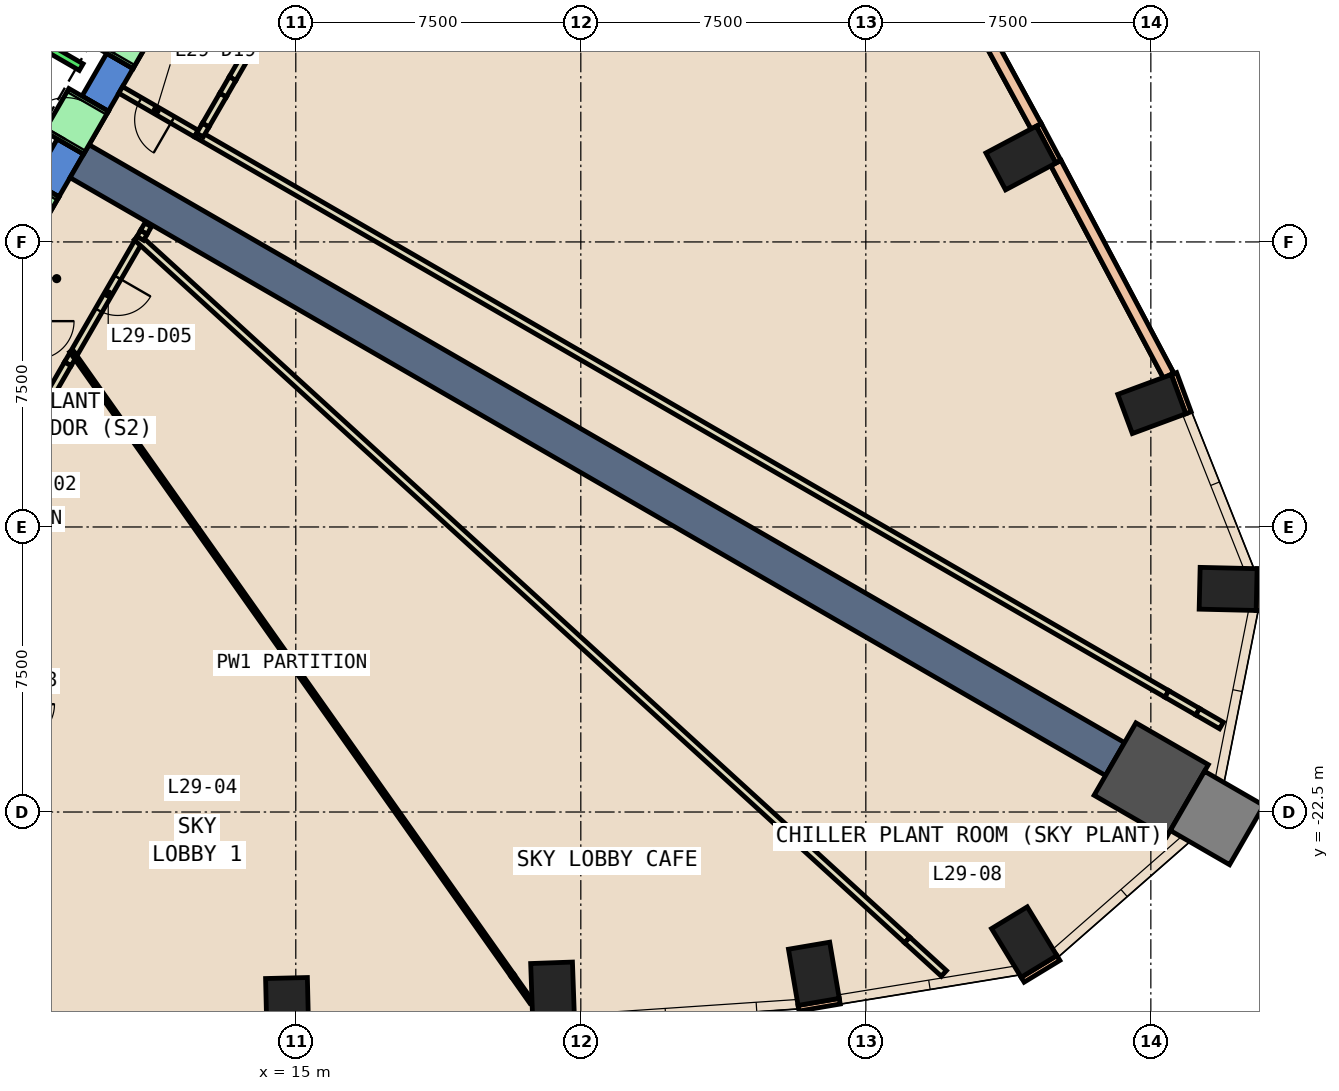
"""IFC4 building model, lengths in metres.
Left out: names, types, materials, properties, quantities, classifications, styles, units other than length and angle.
Written with IfcOpenShell. Run it as: python <this file> out.ifc"""

import sys

from ifc_helpers import new_model, si_unit, direction, frame, frame_2d, origin, origin_2d, place, context, subcontext, project, spatial, polyline, rectangle, outline, extrude, element, fill, save


model = new_model("IFC4")
c1 = context("Model", 3, precision=1e-05, world=origin(), true_north=direction((0.0, 1.0)))
c2 = subcontext(c1, "Body", "Model", "MODEL_VIEW")
j1 = project(units=[si_unit("LENGTHUNIT", "METRE"), si_unit("PLANEANGLEUNIT", "RADIAN")], contexts=[c1])
p1 = place(None, origin())
s1 = spatial("IfcSite", under=j1, at=p1, CompositionType="ELEMENT")
p2 = place(p1, origin())
s2 = spatial("IfcBuilding", under=s1, at=p2, CompositionType="ELEMENT")
p3 = place(p2, frame((0.0, 0.0, 132.8)))
s3 = spatial("IfcBuildingStorey", under=s2, at=p3, CompositionType="ELEMENT", Elevation=132.8)
for number, where, z_axis, x_axis in (
    (1, (14.773, -27.618, -0.6), (0.0, 0.0, 1.0), (1.0, 0.024, 0.0)),
    (2, (21.757, -27.217, -0.6), (0.0, 0.0, 1.0), (0.999, 0.035, 0.0)),
    (3, (28.633, -26.757, -0.6), (0.0, 0.0, 1.0), (0.986, 0.168, 0.0)),
    (4, (34.168, -25.922, -0.6), (0.0, 0.0, 1.0), (0.854, 0.52, 0.0)),
):
    element("IfcColumn", number, at=place(p3, frame(where, z_axis=z_axis, x_axis=x_axis)), inside=s3, PredefinedType="COLUMN", context=c2, shape_type="SweptSolid", body=[
        extrude(rectangle(XDim=1.1, YDim=1.5, at=origin_2d()), origin(), (0.0, 0.0, 1.0), 5.4),
    ])
p4 = place(p3, frame((37.51, -21.657, -0.6), z_axis=(0.0, 0.0, 1.0), x_axis=(-0.866025403784, 0.5, 0.0)))
e5 = element("IfcColumn", 5, at=p4, inside=s3, PredefinedType="COLUMN", context=c2, shape_type="SweptSolid", body=[
    extrude(rectangle(XDim=2.2, YDim=2.2, at=origin_2d()), origin(), (0.0, 0.0, 1.0), 5.4),
])
for number, where, z_axis, x_axis in (
    (6, (39.534, -16.63, -0.6), (0.0, 0.0, 1.0), (0.023, 1.0, 0.0)),
    (7, (37.525, -11.766, -0.6), (0.0, 0.0, 1.0), (-0.347, 0.938, 0.0)),
    (8, (34.081, -5.292, -0.6), (0.0, 0.0, 1.0), (-0.469, 0.883, 0.0)),
):
    element("IfcColumn", number, at=place(p3, frame(where, z_axis=z_axis, x_axis=x_axis)), inside=s3, PredefinedType="COLUMN", context=c2, shape_type="SweptSolid", body=[
        extrude(rectangle(XDim=1.1, YDim=1.5, at=origin_2d()), origin(), (0.0, 0.0, 1.0), 5.4),
    ])
p5 = place(p3, frame((39.242, -22.657, -0.6), z_axis=(0.0, 0.0, 1.0), x_axis=(-0.866025403784, 0.5, 0.0)))
e9 = element("IfcColumn", 9, at=p5, inside=s3, PredefinedType="COLUMN", context=c2, shape_type="SweptSolid", body=[
    extrude(rectangle(XDim=1.8, YDim=1.8, at=origin_2d()), origin(), (0.0, 0.0, 1.0), 5.4),
])
p6 = place(p3, frame((0.0, 0.0, -0.6)))
e10 = element("IfcWall", 10, at=p6, inside=s3, PredefinedType="SHEAR", context=c2, shape_type="SweptSolid", body=[
    extrude(outline(polyline([(9.417, -5.189), (8.724, -4.789), (8.075, -5.914), (8.767, -6.314), (9.417, -5.189)])), origin(), (0.0, 0.0, 1.0), 5.4),
])
p7 = place(p3, frame((0.0, 0.0, -0.6)))
e11 = element("IfcWall", 11, at=p7, inside=s3, PredefinedType="SHEAR", context=c2, shape_type="SweptSolid", body=[
    extrude(outline(polyline([(10.717, -2.937), (10.025, -2.537), (9.374, -3.663), (10.067, -4.063), (10.717, -2.937)])), origin(), (0.0, 0.0, 1.0), 5.4),
])
p8 = place(p3, frame((0.0, 0.0, 3.6)))
e12 = element("IfcWall", 12, at=p8, inside=s3, PredefinedType="SHEAR", context=c2, shape_type="SweptSolid", body=[
    extrude(outline(polyline([(8.767, -6.314), (8.075, -5.914), (7.424, -7.04), (8.117, -7.44), (8.767, -6.314)])), origin(), (0.0, 0.0, 1.0), 1.2),
])
p9 = place(p3, frame((0.0, 0.0, 3.6)))
e13 = element("IfcWall", 13, at=p9, inside=s3, PredefinedType="SHEAR", context=c2, shape_type="SweptSolid", body=[
    extrude(outline(polyline([(10.067, -4.063), (9.374, -3.663), (8.724, -4.789), (9.417, -5.189), (10.067, -4.063)])), origin(), (0.0, 0.0, 1.0), 1.2),
])
p10 = place(p3, frame((0.0, 0.0, 3.6)))
e14 = element("IfcWall", 14, at=p10, inside=s3, PredefinedType="SHEAR", context=c2, shape_type="SweptSolid", body=[
    extrude(outline(polyline([(11.367, -1.811), (10.675, -1.411), (10.025, -2.537), (10.717, -2.937), (11.367, -1.811)])), origin(), (0.0, 0.0, 1.0), 1.2),
])
p11 = place(p3, frame((9.31, -5.375, 0.0), z_axis=(0.0, 0.0, 1.0), x_axis=(0.86602173752, -0.500006350103, 0.0)))
e15 = element("IfcWall", 15, at=p11, inside=s3, PredefinedType="SHEAR", context=c2, shape_type="SweptSolid", body=[
    extrude(rectangle(XDim=31.463, YDim=1.0, at=frame_2d((15.732, 0.0))), origin(), (0.0, 0.0, 1.0), 4.8),
])
p12 = place(p3, frame((38.49, -11.995, 0.0), z_axis=(0.0, 0.0, 1.0), x_axis=(-0.347133743566, 0.937815634375, 0.0)))
e16 = element("IfcWall", 16, at=p12, inside=s3, PredefinedType="STANDARD", context=c2, shape_type="SweptSolid", body=[
    extrude(rectangle(XDim=1.101, YDim=0.15, at=frame_2d((0.55, 0.0))), origin(), (0.0, 0.0, 1.0), 4.8),
])
p13 = place(p3, frame((35.068, -5.391, 0.0), z_axis=(0.0, 0.0, 1.0), x_axis=(-0.469274244365, 0.883052480646, 0.0)))
e17 = element("IfcWall", 17, at=p13, inside=s3, PredefinedType="STANDARD", context=c2, shape_type="SweptSolid", body=[
    extrude(rectangle(XDim=1.1, YDim=0.15, at=frame_2d((0.55, 0.0))), origin(), (0.0, 0.0, 1.0), 4.8),
])
p14 = place(p3, frame((28.229, -27.663, 0.0), z_axis=(0.0, 0.0, 1.0), x_axis=(0.985763338892, 0.168138751323, 0.0)))
e18 = element("IfcWall", 18, at=p14, inside=s3, PredefinedType="STANDARD", context=c2, shape_type="SweptSolid", body=[
    extrude(rectangle(XDim=1.101, YDim=0.15, at=frame_2d((0.55, 0.0))), origin(), (0.0, 0.0, 1.0), 4.8),
])
p15 = place(p3, frame((34.127, -26.913, 0.0), z_axis=(0.0, 0.0, 1.0), x_axis=(0.854245682901, 0.519869515594, 0.0)))
e19 = element("IfcWall", 19, at=p15, inside=s3, PredefinedType="STANDARD", context=c2, shape_type="SweptSolid", body=[
    extrude(rectangle(XDim=1.1, YDim=0.15, at=frame_2d((0.55, 0.0))), origin(), (0.0, 0.0, 1.0), 4.8),
])
p16 = place(p3, frame((40.346, -17.199, 0.0), z_axis=(0.0, 0.0, 1.0), x_axis=(0.023744690764, 0.999718055084, 0.0)))
e20 = element("IfcWall", 20, at=p16, inside=s3, PredefinedType="STANDARD", context=c2, shape_type="SweptSolid", body=[
    extrude(rectangle(XDim=1.1, YDim=0.15, at=frame_2d((0.55, 0.0))), origin(), (0.0, 0.0, 1.0), 4.8),
])
p17 = place(p3, frame((37.967, -11.016, 0.0), z_axis=(0.0, 0.0, 1.0), x_axis=(-0.468639020107, 0.88338976043, 0.0)))
e21 = element("IfcWall", 21, at=p17, inside=s3, PredefinedType="STANDARD", context=c2, shape_type="SweptSolid", body=[
    extrude(rectangle(XDim=6.329, YDim=0.3, at=frame_2d((3.165, 0.0))), origin(), (0.0, 0.0, 1.0), 1.2),
])
p18 = place(p3, frame((37.967, -11.016, 4.0), z_axis=(0.0, 0.0, 1.0), x_axis=(-0.468639020107, 0.88338976043, 0.0)))
e22 = element("IfcWall", 22, at=p18, inside=s3, PredefinedType="STANDARD", context=c2, shape_type="SweptSolid", body=[
    extrude(rectangle(XDim=6.329, YDim=0.3, at=frame_2d((3.165, 0.0))), origin(), (0.0, 0.0, 1.0), 0.8),
])
p19 = place(p3, frame((34.481, -4.458, 0.0), z_axis=(0.0, 0.0, 1.0), x_axis=(-0.477655263247, 0.878547351879, 0.0)))
e23 = element("IfcWall", 23, at=p19, inside=s3, PredefinedType="STANDARD", context=c2, shape_type="SweptSolid", body=[
    extrude(rectangle(XDim=6.119, YDim=0.3, at=frame_2d((3.06, 0.0))), origin(), (0.0, 0.0, 1.0), 1.2),
])
p20 = place(p3, frame((34.481, -4.458, 4.0), z_axis=(0.0, 0.0, 1.0), x_axis=(-0.477655263247, 0.878547351879, 0.0)))
e24 = element("IfcWall", 24, at=p20, inside=s3, PredefinedType="STANDARD", context=c2, shape_type="SweptSolid", body=[
    extrude(rectangle(XDim=6.119, YDim=0.3, at=frame_2d((3.06, 0.0))), origin(), (0.0, 0.0, 1.0), 0.8),
])
p21 = place(p3, frame((9.145, -10.46, 0.0), z_axis=(0.0, 0.0, 1.0), x_axis=(-0.500701704226, -0.865619895442, 0.0)))
e25 = element("IfcWall", 25, at=p21, inside=s3, PredefinedType="PARTITIONING", context=c2, shape_type="SweptSolid", body=[
    extrude(rectangle(XDim=0.288, YDim=0.2, at=frame_2d((0.144, 0.0))), origin(), (0.0, 0.0, 1.0), 4.8),
])
p22 = place(p3, frame((10.89, -7.437, 0.0), z_axis=(0.0, 0.0, 1.0), x_axis=(-0.499905227862, -0.86608011359, 0.0)))
e26 = element("IfcWall", 26, at=p22, inside=s3, PredefinedType="PARTITIONING", context=c2, shape_type="SweptSolid", body=[
    extrude(rectangle(XDim=3.43, YDim=0.2, at=frame_2d((1.715, 0.0))), origin(), (0.0, 0.0, 1.0), 4.8),
])
p23 = place(p22, frame((1.152, 0.0, 0.0)))
e27 = element("IfcOpeningElement", 27, at=p23, cuts=e26, PredefinedType="OPENING", context=c2, shape_type="SweptSolid", body=[
    extrude(rectangle(XDim=1.0, YDim=2.1, at=frame_2d((0.5, 1.05))), frame((0.0, 0.11, 0.0), z_axis=(0.0, -1.0, 0.0), x_axis=(1.0, 0.0, 0.0)), (0.0, 0.0, 1.0), 0.22),
])
p24 = place(p3, frame((11.113, -7.051, 0.0), z_axis=(0.0, 0.0, 1.0), x_axis=(-0.499504513693, -0.866311284008, 0.0)))
e28 = element("IfcWall", 28, at=p24, inside=s3, PredefinedType="PARTITIONING", context=c2, shape_type="SweptSolid", body=[
    extrude(rectangle(XDim=0.226, YDim=0.2, at=frame_2d((0.113, 0.0))), origin(), (0.0, 0.0, 1.0), 2.1),
])
p25 = place(p3, frame((9.092, -10.37, 0.0), z_axis=(0.0, 0.0, 1.0), x_axis=(0.577122389033, -0.816657668841, 0.0)))
e29 = element("IfcWall", 29, at=p25, inside=s3, PredefinedType="PARTITIONING", context=c2, shape_type="SweptSolid", body=[
    extrude(rectangle(XDim=20.118, YDim=0.1, at=frame_2d((10.059, 0.0))), origin(), (0.0, 0.0, 1.0), 4.8),
])
p26 = place(p3, frame((10.816, -7.37, 0.0), z_axis=(0.0, 0.0, 1.0), x_axis=(0.738728492096, -0.674003126822, 0.0)))
e30 = element("IfcWall", 30, at=p26, inside=s3, PredefinedType="PARTITIONING", context=c2, shape_type="SweptSolid", body=[
    extrude(rectangle(XDim=27.445, YDim=0.2, at=frame_2d((13.722, 0.0))), origin(), (0.0, 0.0, 1.0), 4.8),
])
p27 = place(p3, frame((12.384, -4.65, 0.0), z_axis=(0.0, 0.0, 1.0), x_axis=(-0.866053019151, 0.499952165731, 0.0)))
e31 = element("IfcWall", 31, at=p27, inside=s3, PredefinedType="PARTITIONING", context=c2, shape_type="SweptSolid", body=[
    extrude(rectangle(XDim=2.3, YDim=0.2, at=frame_2d((1.15, 0.0))), origin(), (0.0, 0.0, 1.0), 4.8),
])
p28 = place(p27, frame((0.721, 0.0, 0.0)))
e32 = element("IfcOpeningElement", 32, at=p28, cuts=e31, PredefinedType="OPENING", context=c2, shape_type="SweptSolid", body=[
    extrude(rectangle(XDim=1.0, YDim=2.1, at=frame_2d((0.5, 1.05))), frame((0.0, 0.11, 0.0), z_axis=(0.0, -1.0, 0.0), x_axis=(1.0, 0.0, 0.0)), (0.0, 0.0, 1.0), 0.22),
])
p29 = place(p3, frame((12.384, -4.65, 0.0), z_axis=(0.0, 0.0, 1.0), x_axis=(0.866033509011, -0.499985961072, 0.0)))
e33 = element("IfcWall", 33, at=p29, inside=s3, PredefinedType="PARTITIONING", context=c2, shape_type="SweptSolid", body=[
    extrude(rectangle(XDim=29.487, YDim=0.2, at=frame_2d((14.744, 0.0))), origin(), (0.0, 0.0, 1.0), 4.8),
])
p30 = place(p3, frame((9.001, -10.709, 0.0), z_axis=(0.0, 0.0, 1.0), x_axis=(-0.499753940741, -0.866167419564, 0.0)))
e34 = element("IfcWall", 34, at=p30, inside=s3, PredefinedType="PARTITIONING", context=c2, shape_type="SweptSolid", body=[
    extrude(rectangle(XDim=1.119, YDim=0.2, at=frame_2d((0.559, 0.0))), origin(), (0.0, 0.0, 1.0), 2.4),
])
p31 = place(p3, frame((11.0, -7.247, 0.0), z_axis=(0.0, 0.0, 1.0), x_axis=(-0.498843983803, -0.866691802098, 0.0)))
e35 = element("IfcWall", 35, at=p31, inside=s3, PredefinedType="PARTITIONING", context=c2, shape_type="SweptSolid", body=[
    extrude(rectangle(XDim=0.185, YDim=0.2, at=frame_2d((0.092, 0.0))), origin(), (0.0, 0.0, 1.0), 4.8),
])
p32 = place(p3, frame((20.703, -26.8, 0.0), z_axis=(0.0, 0.0, 1.0), x_axis=(0.577265327721, -0.816556636989, 0.0)))
e36 = element("IfcWall", 36, at=p32, inside=s3, PredefinedType="PARTITIONING", context=c2, shape_type="SweptSolid", body=[
    extrude(rectangle(XDim=0.856, YDim=0.1, at=frame_2d((0.428, 0.0))), origin(), (0.0, 0.0, 1.0), 2.4),
])
p33 = place(p3, frame((31.09, -25.868, 0.0), z_axis=(0.0, 0.0, 1.0), x_axis=(0.738829774286, -0.673892101622, 0.0)))
e37 = element("IfcWall", 37, at=p33, inside=s3, PredefinedType="PARTITIONING", context=c2, shape_type="SweptSolid", body=[
    extrude(rectangle(XDim=1.305, YDim=0.2, at=frame_2d((0.652, 0.0))), origin(), (0.0, 0.0, 1.0), 2.1),
])
p34 = place(p3, frame((37.921, -19.393, 0.0), z_axis=(0.0, 0.0, 1.0), x_axis=(0.865942754999, -0.50014312458, 0.0)))
e38 = element("IfcWall", 38, at=p34, inside=s3, PredefinedType="PARTITIONING", context=c2, shape_type="SweptSolid", body=[
    extrude(rectangle(XDim=0.938, YDim=0.2, at=frame_2d((0.469, 0.0))), origin(), (0.0, 0.0, 1.0), 2.1),
])
p35 = place(p3, frame((38.733, -19.862, 0.0), z_axis=(0.0, 0.0, 1.0), x_axis=(0.866027848477, -0.499995765644, 0.0)))
e39 = element("IfcWall", 39, at=p35, inside=s3, PredefinedType="PARTITIONING", context=c2, shape_type="SweptSolid", body=[
    extrude(rectangle(XDim=0.722, YDim=0.2, at=frame_2d((0.361, 0.0))), origin(), (0.0, 0.0, 1.0), 4.8),
])
p36 = place(p3, frame((13.806, -2.387, 0.0), z_axis=(0.0, 0.0, 1.0), x_axis=(-0.499572668549, -0.866271983178, 0.0)))
e40 = element("IfcWall", 40, at=p36, inside=s3, PredefinedType="PARTITIONING", context=c2, shape_type="SweptSolid", body=[
    extrude(rectangle(XDim=0.941, YDim=0.2, at=frame_2d((0.47, 0.0))), origin(), (0.0, 0.0, 1.0), 2.4),
])
p37 = place(p3, frame((13.336, -3.202, 0.0), z_axis=(0.0, 0.0, 1.0), x_axis=(-0.499694399542, -0.866201770413, 0.0)))
e41 = element("IfcWall", 41, at=p37, inside=s3, PredefinedType="PARTITIONING", context=c2, shape_type="SweptSolid", body=[
    extrude(rectangle(XDim=0.502, YDim=0.2, at=frame_2d((0.251, 0.0))), origin(), (0.0, 0.0, 1.0), 4.8),
])
p38 = place(p3, frame((13.085, -3.637, 0.0), z_axis=(0.0, 0.0, 1.0), x_axis=(-0.500402557727, -0.865792862191, 0.0)))
e42 = element("IfcWall", 42, at=p38, inside=s3, PredefinedType="PARTITIONING", context=c2, shape_type="SweptSolid", body=[
    extrude(rectangle(XDim=0.911, YDim=0.2, at=frame_2d((0.456, 0.0))), origin(), (0.0, 0.0, 1.0), 2.1),
])
p39 = place(p3, frame((12.629, -4.426, 0.0), z_axis=(0.0, 0.0, 1.0), x_axis=(-0.500493465029, -0.865740314103, 0.0)))
e43 = element("IfcWall", 43, at=p39, inside=s3, PredefinedType="PARTITIONING", context=c2, shape_type="SweptSolid", body=[
    extrude(rectangle(XDim=0.302, YDim=0.2, at=frame_2d((0.151, 0.0))), origin(), (0.0, 0.0, 1.0), 4.8),
])
p40 = place(p3, frame((4.451, -6.19, 0.0), z_axis=(0.0, 0.0, 1.0), x_axis=(0.50000090737, 0.866024879913, 0.0)))
e44 = element("IfcWall", 44, at=p40, inside=s3, PredefinedType="STANDARD", context=c2, shape_type="SweptSolid", body=[
    extrude(rectangle(XDim=10.6, YDim=0.2, at=frame_2d((5.3, 0.0))), origin(), (0.0, 0.0, 1.0), 4.8),
])
p41 = place(p3, frame((7.188, -1.65, 0.0), z_axis=(0.0, 0.0, 1.0), x_axis=(0.866022959057, -0.500004234368, 0.0)))
e45 = element("IfcWall", 45, at=p41, inside=s3, PredefinedType="STANDARD", context=c2, shape_type="SweptSolid", body=[
    extrude(rectangle(XDim=2.5, YDim=0.2, at=frame_2d((1.25, 0.0))), origin(), (0.0, 0.0, 1.0), 4.8),
])
p42 = place(p3, frame((7.598, -7.14, 0.0), z_axis=(0.0, 0.0, 1.0), x_axis=(0.500362116554, 0.865816234728, 0.0)))
e46 = element("IfcWall", 46, at=p42, inside=s3, PredefinedType="STANDARD", context=c2, shape_type="SweptSolid", body=[
    extrude(rectangle(XDim=1.299, YDim=1.2, at=frame_2d((0.65, 0.0))), origin(), (0.0, 0.0, 1.0), 2.4),
])
p43 = place(p42, frame((0.1, 0.0, 0.0)))
e47 = element("IfcOpeningElement", 47, at=p43, cuts=e46, PredefinedType="OPENING", context=c2, shape_type="SweptSolid", body=[
    extrude(rectangle(XDim=1.1, YDim=2.3, at=frame_2d((0.55, 1.15))), frame((0.0, 0.61, 0.0), z_axis=(0.0, -1.0, 0.0), x_axis=(1.0, 0.0, 0.0)), (0.0, 0.0, 1.0), 1.22),
])
p44 = place(p3, frame((8.898, -4.889, 0.0), z_axis=(0.0, 0.0, 1.0), x_axis=(0.500036693733, 0.866004217611, 0.0)))
e48 = element("IfcWall", 48, at=p44, inside=s3, PredefinedType="STANDARD", context=c2, shape_type="SweptSolid", body=[
    extrude(rectangle(XDim=1.3, YDim=1.2, at=frame_2d((0.65, 0.0))), origin(), (0.0, 0.0, 1.0), 2.4),
])
p45 = place(p44, frame((0.1, 0.0, 0.0)))
e49 = element("IfcOpeningElement", 49, at=p45, cuts=e48, PredefinedType="OPENING", context=c2, shape_type="SweptSolid", body=[
    extrude(rectangle(XDim=1.1, YDim=2.3, at=frame_2d((0.55, 1.15))), frame((0.0, 0.61, 0.0), z_axis=(0.0, -1.0, 0.0), x_axis=(1.0, 0.0, 0.0)), (0.0, 0.0, 1.0), 1.22),
])
p46 = place(p3, frame((10.198, -2.637, 0.0), z_axis=(0.0, 0.0, 1.0), x_axis=(0.49989585183, 0.866085525409, 0.0)))
e50 = element("IfcWall", 50, at=p46, inside=s3, PredefinedType="STANDARD", context=c2, shape_type="SweptSolid", body=[
    extrude(rectangle(XDim=1.3, YDim=1.2, at=frame_2d((0.65, 0.0))), origin(), (0.0, 0.0, 1.0), 2.4),
])
p47 = place(p46, frame((0.1, 0.0, 0.0)))
e51 = element("IfcOpeningElement", 51, at=p47, cuts=e50, PredefinedType="OPENING", context=c2, shape_type="SweptSolid", body=[
    extrude(rectangle(XDim=1.1, YDim=2.3, at=frame_2d((0.55, 1.15))), frame((0.0, 0.61, 0.0), z_axis=(0.0, -1.0, 0.0), x_axis=(1.0, 0.0, 0.0)), (0.0, 0.0, 1.0), 1.22),
])
p48 = place(p23, origin())
e52 = element("IfcDoor", 52, at=p48, inside=s3, OperationType="SINGLE_SWING_LEFT", PredefinedType="DOOR", context=c2, shape_type="SweptSolid", body=[
    extrude(rectangle(XDim=1.0, YDim=2.1, at=frame_2d((0.5, 1.05))), frame((0.0, 0.025, 0.0), z_axis=(0.0, -1.0, 0.0), x_axis=(1.0, 0.0, 0.0)), (0.0, 0.0, 1.0), 0.05),
])
fill(e27, e52)
p49 = place(p28, origin())
e53 = element("IfcDoor", 53, at=p49, inside=s3, OperationType="SINGLE_SWING_LEFT", PredefinedType="DOOR", context=c2, shape_type="SweptSolid", body=[
    extrude(rectangle(XDim=1.0, YDim=2.1, at=frame_2d((0.5, 1.05))), frame((0.0, 0.025, 0.0), z_axis=(0.0, -1.0, 0.0), x_axis=(1.0, 0.0, 0.0)), (0.0, 0.0, 1.0), 0.05),
])
fill(e32, e53)
p50 = place(p45, origin())
e54 = element("IfcDoor", 54, at=p50, inside=s3, OperationType="SLIDING_TO_LEFT", PredefinedType="DOOR", context=c2, shape_type="SweptSolid", body=[
    extrude(rectangle(XDim=1.1, YDim=2.3, at=frame_2d((0.55, 1.15))), frame((0.0, 0.025, 0.0), z_axis=(0.0, -1.0, 0.0), x_axis=(1.0, 0.0, 0.0)), (0.0, 0.0, 1.0), 0.05),
])
fill(e49, e54)
p51 = place(p47, origin())
e55 = element("IfcDoor", 55, at=p51, inside=s3, OperationType="SLIDING_TO_LEFT", PredefinedType="DOOR", context=c2, shape_type="SweptSolid", body=[
    extrude(rectangle(XDim=1.1, YDim=2.3, at=frame_2d((0.55, 1.15))), frame((0.0, 0.025, 0.0), z_axis=(0.0, -1.0, 0.0), x_axis=(1.0, 0.0, 0.0)), (0.0, 0.0, 1.0), 0.05),
])
fill(e51, e55)
save(model, sys.argv[1])
